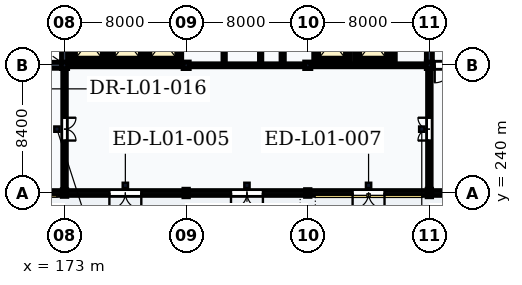
"""IFC4 building model, lengths in metres.
Left out: names, types, materials, properties, quantities, classifications, styles, units other than length and angle.
Written with IfcOpenShell. Run it as: python <this file> out.ifc"""

import sys

from ifc_helpers import new_model, si_unit, direction, frame, frame_2d, origin, origin_2d, place, context, subcontext, project, spatial, rectangle, i_section, extrude, element, fill, save


model = new_model("IFC4")
c1 = context("Model", 3, precision=1e-05, world=origin(), true_north=direction((0.0, 1.0)))
c2 = subcontext(c1, "Body", "Model", "MODEL_VIEW")
j1 = project(units=[si_unit("LENGTHUNIT", "METRE"), si_unit("PLANEANGLEUNIT", "RADIAN")], contexts=[c1])
p1 = place(None, origin())
s1 = spatial("IfcSite", under=j1, at=p1, CompositionType="ELEMENT")
p2 = place(p1, origin())
s2 = spatial("IfcBuilding", under=s1, at=p2, CompositionType="ELEMENT")
p3 = place(p2, origin())
s3 = spatial("IfcBuildingStorey", under=s2, at=p3, CompositionType="ELEMENT", Elevation=0.0)
p4 = place(p3, frame((173.0, 240.0, 0.0), z_axis=(0.0, 0.0, 1.0), x_axis=(1.0, 0.0, 0.0)))
e1 = element("IfcColumn", 1, at=p4, inside=s3, PredefinedType="COLUMN", context=c2, shape_type="SweptSolid", body=[
    extrude(i_section(OverallWidth=0.3, OverallDepth=0.45, WebThickness=0.014, FlangeThickness=0.026, FilletRadius=0.027, at=origin_2d()), origin(), (0.0, 0.0, 1.0), 5.4),
])
p5 = place(p3, frame((173.0, 248.4, 0.0), z_axis=(0.0, 0.0, 1.0), x_axis=(1.0, 0.0, 0.0)))
e2 = element("IfcColumn", 2, at=p5, inside=s3, PredefinedType="COLUMN", context=c2, shape_type="SweptSolid", body=[
    extrude(i_section(OverallWidth=0.412, OverallDepth=0.435, WebThickness=0.036, FlangeThickness=0.057, FilletRadius=0.015, at=origin_2d()), origin(), (0.0, 0.0, 1.0), 5.4),
])
p6 = place(p3, frame((181.0, 240.0, 0.0), z_axis=(0.0, 0.0, 1.0), x_axis=(1.0, 0.0, 0.0)))
e3 = element("IfcColumn", 3, at=p6, inside=s3, PredefinedType="COLUMN", context=c2, shape_type="SweptSolid", body=[
    extrude(i_section(OverallWidth=0.3, OverallDepth=0.5, WebThickness=0.014, FlangeThickness=0.028, FilletRadius=0.027, at=origin_2d()), origin(), (0.0, 0.0, 1.0), 5.4),
])
p7 = place(p3, frame((181.0, 248.4, 0.0), z_axis=(0.0, 0.0, 1.0), x_axis=(1.0, 0.0, 0.0)))
e4 = element("IfcColumn", 4, at=p7, inside=s3, PredefinedType="COLUMN", context=c2, shape_type="SweptSolid", body=[
    extrude(i_section(OverallWidth=0.412, OverallDepth=0.435, WebThickness=0.036, FlangeThickness=0.057, FilletRadius=0.015, at=origin_2d()), origin(), (0.0, 0.0, 1.0), 5.4),
])
p8 = place(p3, frame((189.0, 240.0, 0.0), z_axis=(0.0, 0.0, 1.0), x_axis=(1.0, 0.0, 0.0)))
e5 = element("IfcColumn", 5, at=p8, inside=s3, PredefinedType="COLUMN", context=c2, shape_type="SweptSolid", body=[
    extrude(i_section(OverallWidth=0.3, OverallDepth=0.45, WebThickness=0.014, FlangeThickness=0.026, FilletRadius=0.027, at=origin_2d()), origin(), (0.0, 0.0, 1.0), 5.4),
])
p9 = place(p3, frame((189.0, 248.4, 0.0), z_axis=(0.0, 0.0, 1.0), x_axis=(1.0, 0.0, 0.0)))
e6 = element("IfcColumn", 6, at=p9, inside=s3, PredefinedType="COLUMN", context=c2, shape_type="SweptSolid", body=[
    extrude(i_section(OverallWidth=0.412, OverallDepth=0.435, WebThickness=0.036, FlangeThickness=0.057, FilletRadius=0.015, at=origin_2d()), origin(), (0.0, 0.0, 1.0), 5.4),
])
p10 = place(p3, frame((197.0, 240.0, 0.0), z_axis=(0.0, 0.0, 1.0), x_axis=(1.0, 0.0, 0.0)))
e7 = element("IfcColumn", 7, at=p10, inside=s3, PredefinedType="COLUMN", context=c2, shape_type="SweptSolid", body=[
    extrude(i_section(OverallWidth=0.3, OverallDepth=0.5, WebThickness=0.014, FlangeThickness=0.028, FilletRadius=0.027, at=origin_2d()), origin(), (0.0, 0.0, 1.0), 5.4),
])
p11 = place(p3, frame((197.0, 248.4, 0.0), z_axis=(0.0, 0.0, 1.0), x_axis=(1.0, 0.0, 0.0)))
e8 = element("IfcColumn", 8, at=p11, inside=s3, PredefinedType="COLUMN", context=c2, shape_type="SweptSolid", body=[
    extrude(i_section(OverallWidth=0.412, OverallDepth=0.435, WebThickness=0.036, FlangeThickness=0.057, FilletRadius=0.015, at=origin_2d()), origin(), (0.0, 0.0, 1.0), 5.4),
])
p12 = place(p3, frame((165.006, 240.0, 0.0), z_axis=(0.0, 0.0, 1.0), x_axis=(1.0, 0.0, 0.0)))
e9 = element("IfcWall", 9, at=p12, inside=s3, PredefinedType="SOLIDWALL", context=c2, shape_type="SweptSolid", body=[
    extrude(rectangle(XDim=7.988, YDim=0.32, at=frame_2d((3.994, 0.0))), origin(), (0.0, 0.0, 1.0), 4.838),
])
p13 = place(p12, frame((2.944, 0.0, 0.0)))
e10 = element("IfcOpeningElement", 10, at=p13, cuts=e9, PredefinedType="OPENING", context=c2, shape_type="SweptSolid", body=[
    extrude(rectangle(XDim=2.1, YDim=2.7, at=frame_2d((1.05, 1.35))), frame((0.0, 0.175, 0.0), z_axis=(0.0, -1.0, 0.0), x_axis=(1.0, 0.0, 0.0)), (0.0, 0.0, 1.0), 0.35),
])
p14 = place(p3, frame((173.006, 240.0, 0.0), z_axis=(0.0, 0.0, 1.0), x_axis=(1.0, 0.0, 0.0)))
e11 = element("IfcWall", 11, at=p14, inside=s3, PredefinedType="SOLIDWALL", context=c2, shape_type="SweptSolid", body=[
    extrude(rectangle(XDim=7.988, YDim=0.32, at=frame_2d((3.994, 0.0))), origin(), (0.0, 0.0, 1.0), 4.838),
])
p15 = place(p14, frame((2.944, 0.0, 0.0)))
e12 = element("IfcOpeningElement", 12, at=p15, cuts=e11, PredefinedType="OPENING", context=c2, shape_type="SweptSolid", body=[
    extrude(rectangle(XDim=2.1, YDim=2.7, at=frame_2d((1.05, 1.35))), frame((0.0, 0.175, 0.0), z_axis=(0.0, -1.0, 0.0), x_axis=(1.0, 0.0, 0.0)), (0.0, 0.0, 1.0), 0.35),
])
p16 = place(p3, frame((181.006, 240.0, 0.0), z_axis=(0.0, 0.0, 1.0), x_axis=(1.0, 0.0, 0.0)))
e13 = element("IfcWall", 13, at=p16, inside=s3, PredefinedType="SOLIDWALL", context=c2, shape_type="SweptSolid", body=[
    extrude(rectangle(XDim=7.988, YDim=0.32, at=frame_2d((3.994, 0.0))), origin(), (0.0, 0.0, 1.0), 4.838),
])
p17 = place(p16, frame((2.944, 0.0, 0.0)))
e14 = element("IfcOpeningElement", 14, at=p17, cuts=e13, PredefinedType="OPENING", context=c2, shape_type="SweptSolid", body=[
    extrude(rectangle(XDim=2.1, YDim=2.7, at=frame_2d((1.05, 1.35))), frame((0.0, 0.175, 0.0), z_axis=(0.0, -1.0, 0.0), x_axis=(1.0, 0.0, 0.0)), (0.0, 0.0, 1.0), 0.35),
])
p18 = place(p3, frame((189.006, 240.0, 0.0), z_axis=(0.0, 0.0, 1.0), x_axis=(1.0, 0.0, 0.0)))
e15 = element("IfcWall", 15, at=p18, inside=s3, PredefinedType="SOLIDWALL", context=c2, shape_type="SweptSolid", body=[
    extrude(rectangle(XDim=7.988, YDim=0.32, at=frame_2d((3.994, 0.0))), origin(), (0.0, 0.0, 1.0), 4.838),
])
p19 = place(p18, frame((2.944, 0.0, 0.0)))
e16 = element("IfcOpeningElement", 16, at=p19, cuts=e15, PredefinedType="OPENING", context=c2, shape_type="SweptSolid", body=[
    extrude(rectangle(XDim=2.1, YDim=2.7, at=frame_2d((1.05, 1.35))), frame((0.0, 0.175, 0.0), z_axis=(0.0, -1.0, 0.0), x_axis=(1.0, 0.0, 0.0)), (0.0, 0.0, 1.0), 0.35),
])
p20 = place(p3, frame((197.006, 240.0, 0.0), z_axis=(0.0, 0.0, 1.0), x_axis=(1.0, 0.0, 0.0)))
e17 = element("IfcWall", 17, at=p20, inside=s3, PredefinedType="SOLIDWALL", context=c2, shape_type="SweptSolid", body=[
    extrude(rectangle(XDim=7.988, YDim=0.32, at=frame_2d((3.994, 0.0))), origin(), (0.0, 0.0, 1.0), 4.838),
])
p21 = place(p20, frame((2.944, 0.0, 0.0)))
e18 = element("IfcOpeningElement", 18, at=p21, cuts=e17, PredefinedType="OPENING", context=c2, shape_type="SweptSolid", body=[
    extrude(rectangle(XDim=2.1, YDim=2.7, at=frame_2d((1.05, 1.35))), frame((0.0, 0.175, 0.0), z_axis=(0.0, -1.0, 0.0), x_axis=(1.0, 0.0, 0.0)), (0.0, 0.0, 1.0), 0.35),
])
p22 = place(p3, frame((120.1, 240.1, 5.4), z_axis=(0.0, 0.0, 1.0), x_axis=(1.0, 0.0, 0.0)))
e19 = element("IfcWall", 19, at=p22, inside=s3, PredefinedType="PARAPET", context=c2, shape_type="SweptSolid", body=[
    extrude(rectangle(XDim=167.8, YDim=0.18, at=frame_2d((83.9, 0.0))), origin(), (0.0, 0.0, 1.0), 1.2),
])
p23 = place(p3, frame((165.0, 248.4, 0.0), z_axis=(0.0, 0.0, 1.0), x_axis=(1.0, 0.0, 0.0)))
e20 = element("IfcWall", 20, at=p23, inside=s3, PredefinedType="SHEAR", context=c2, shape_type="SweptSolid", body=[
    extrude(rectangle(XDim=8.0, YDim=0.4, at=frame_2d((4.0, 0.0))), origin(), (0.0, 0.0, 1.0), 5.14),
])
p24 = place(p23, frame((0.35, 0.0, 0.0)))
e21 = element("IfcOpeningElement", 21, at=p24, cuts=e20, PredefinedType="OPENING", context=c2, shape_type="SweptSolid", body=[
    extrude(rectangle(XDim=1.15, YDim=2.15, at=frame_2d((0.575, 1.075))), frame((0.0, 0.215, 0.0), z_axis=(0.0, -1.0, 0.0), x_axis=(1.0, 0.0, 0.0)), (0.0, 0.0, 1.0), 0.43),
])
p25 = place(p3, frame((173.0, 248.4, 0.0), z_axis=(0.0, 0.0, 1.0), x_axis=(0.0, 1.0, 0.0)))
e22 = element("IfcWall", 22, at=p25, inside=s3, PredefinedType="SHEAR", context=c2, shape_type="SweptSolid", body=[
    extrude(rectangle(XDim=6.8, YDim=0.4, at=frame_2d((3.4, 0.0))), origin(), (0.0, 0.0, 1.0), 5.14),
])
p26 = place(p3, frame((197.0, 248.4, 0.0), z_axis=(0.0, 0.0, 1.0), x_axis=(1.0, 0.0, 0.0)))
e23 = element("IfcWall", 23, at=p26, inside=s3, PredefinedType="SHEAR", context=c2, shape_type="SweptSolid", body=[
    extrude(rectangle(XDim=8.0, YDim=0.4, at=frame_2d((4.0, 0.0))), origin(), (0.0, 0.0, 1.0), 5.14),
])
p27 = place(p26, frame((0.35, 0.0, 0.0)))
e24 = element("IfcOpeningElement", 24, at=p27, cuts=e23, PredefinedType="OPENING", context=c2, shape_type="SweptSolid", body=[
    extrude(rectangle(XDim=1.15, YDim=2.15, at=frame_2d((0.575, 1.075))), frame((0.0, 0.215, 0.0), z_axis=(0.0, -1.0, 0.0), x_axis=(1.0, 0.0, 0.0)), (0.0, 0.0, 1.0), 0.43),
])
p28 = place(p3, frame((197.0, 248.4, 0.0), z_axis=(0.0, 0.0, 1.0), x_axis=(0.0, 1.0, 0.0)))
e25 = element("IfcWall", 25, at=p28, inside=s3, PredefinedType="SHEAR", context=c2, shape_type="SweptSolid", body=[
    extrude(rectangle(XDim=6.8, YDim=0.4, at=frame_2d((3.4, 0.0))), origin(), (0.0, 0.0, 1.0), 5.14),
])
p29 = place(p3, frame((173.5, 248.65, 0.0), z_axis=(0.0, 0.0, 1.0), x_axis=(1.0, 0.0, 0.0)))
e26 = element("IfcWall", 26, at=p29, inside=s3, PredefinedType="SHEAR", context=c2, shape_type="SweptSolid", body=[
    extrude(rectangle(XDim=2.2, YDim=0.22, at=frame_2d((1.1, 0.0))), origin(), (0.0, 0.0, 1.0), 5.14),
])
for number, where, z_axis, x_axis in (
    (27, (173.5, 248.65, 0.0), (0.0, 0.0, 1.0), (0.0, 1.0, 0.0)),
    (28, (175.7, 248.65, 0.0), (0.0, 0.0, 1.0), (0.0, 1.0, 0.0)),
):
    element("IfcWall", number, at=place(p3, frame(where, z_axis=z_axis, x_axis=x_axis)), inside=s3, PredefinedType="SHEAR", context=c2, shape_type="SweptSolid", body=[
        extrude(rectangle(XDim=2.7, YDim=0.22, at=frame_2d((1.35, 0.0))), origin(), (0.0, 0.0, 1.0), 5.14),
    ])
p30 = place(p3, frame((176.0, 248.65, 0.0), z_axis=(0.0, 0.0, 1.0), x_axis=(1.0, 0.0, 0.0)))
e29 = element("IfcWall", 29, at=p30, inside=s3, PredefinedType="SHEAR", context=c2, shape_type="SweptSolid", body=[
    extrude(rectangle(XDim=2.2, YDim=0.22, at=frame_2d((1.1, 0.0))), origin(), (0.0, 0.0, 1.0), 5.14),
])
for number, where, z_axis, x_axis in (
    (30, (176.0, 248.65, 0.0), (0.0, 0.0, 1.0), (0.0, 1.0, 0.0)),
    (31, (178.2, 248.65, 0.0), (0.0, 0.0, 1.0), (0.0, 1.0, 0.0)),
):
    element("IfcWall", number, at=place(p3, frame(where, z_axis=z_axis, x_axis=x_axis)), inside=s3, PredefinedType="SHEAR", context=c2, shape_type="SweptSolid", body=[
        extrude(rectangle(XDim=2.7, YDim=0.22, at=frame_2d((1.35, 0.0))), origin(), (0.0, 0.0, 1.0), 5.14),
    ])
p31 = place(p3, frame((178.4, 248.65, 0.0), z_axis=(0.0, 0.0, 1.0), x_axis=(1.0, 0.0, 0.0)))
e32 = element("IfcWall", 32, at=p31, inside=s3, PredefinedType="SHEAR", context=c2, shape_type="SweptSolid", body=[
    extrude(rectangle(XDim=2.2, YDim=0.22, at=frame_2d((1.1, 0.0))), origin(), (0.0, 0.0, 1.0), 5.14),
])
for number, where, z_axis, x_axis in (
    (33, (178.4, 248.65, 0.0), (0.0, 0.0, 1.0), (0.0, 1.0, 0.0)),
    (34, (180.6, 248.65, 0.0), (0.0, 0.0, 1.0), (0.0, 1.0, 0.0)),
):
    element("IfcWall", number, at=place(p3, frame(where, z_axis=z_axis, x_axis=x_axis)), inside=s3, PredefinedType="SHEAR", context=c2, shape_type="SweptSolid", body=[
        extrude(rectangle(XDim=2.7, YDim=0.22, at=frame_2d((1.35, 0.0))), origin(), (0.0, 0.0, 1.0), 5.14),
    ])
p32 = place(p3, frame((189.5, 248.65, 0.0), z_axis=(0.0, 0.0, 1.0), x_axis=(1.0, 0.0, 0.0)))
e35 = element("IfcWall", 35, at=p32, inside=s3, PredefinedType="SHEAR", context=c2, shape_type="SweptSolid", body=[
    extrude(rectangle(XDim=2.2, YDim=0.22, at=frame_2d((1.1, 0.0))), origin(), (0.0, 0.0, 1.0), 5.14),
])
for number, where, z_axis, x_axis in (
    (36, (189.5, 248.65, 0.0), (0.0, 0.0, 1.0), (0.0, 1.0, 0.0)),
    (37, (191.7, 248.65, 0.0), (0.0, 0.0, 1.0), (0.0, 1.0, 0.0)),
):
    element("IfcWall", number, at=place(p3, frame(where, z_axis=z_axis, x_axis=x_axis)), inside=s3, PredefinedType="SHEAR", context=c2, shape_type="SweptSolid", body=[
        extrude(rectangle(XDim=2.7, YDim=0.22, at=frame_2d((1.35, 0.0))), origin(), (0.0, 0.0, 1.0), 5.14),
    ])
p33 = place(p3, frame((192.2, 248.65, 0.0), z_axis=(0.0, 0.0, 1.0), x_axis=(1.0, 0.0, 0.0)))
e38 = element("IfcWall", 38, at=p33, inside=s3, PredefinedType="SHEAR", context=c2, shape_type="SweptSolid", body=[
    extrude(rectangle(XDim=2.2, YDim=0.22, at=frame_2d((1.1, 0.0))), origin(), (0.0, 0.0, 1.0), 5.14),
])
for number, where, z_axis, x_axis in (
    (39, (192.2, 248.65, 0.0), (0.0, 0.0, 1.0), (0.0, 1.0, 0.0)),
    (40, (194.4, 248.65, 0.0), (0.0, 0.0, 1.0), (0.0, 1.0, 0.0)),
):
    element("IfcWall", number, at=place(p3, frame(where, z_axis=z_axis, x_axis=x_axis)), inside=s3, PredefinedType="SHEAR", context=c2, shape_type="SweptSolid", body=[
        extrude(rectangle(XDim=2.7, YDim=0.22, at=frame_2d((1.35, 0.0))), origin(), (0.0, 0.0, 1.0), 5.14),
    ])
p34 = place(p3, frame((194.65, 248.4, 0.0), z_axis=(0.0, 0.0, 1.0), x_axis=(0.0, 1.0, 0.0)))
e41 = element("IfcWall", 41, at=p34, inside=s3, PredefinedType="PARTITIONING", context=c2, shape_type="SweptSolid", body=[
    extrude(rectangle(XDim=6.8, YDim=0.22, at=frame_2d((3.4, 0.0))), origin(), (0.0, 0.0, 1.0), 5.14),
])
for number, where, z_axis, x_axis in (
    (42, (183.5, 248.4, 0.0), (0.0, 0.0, 1.0), (0.0, 1.0, 0.0)),
    (43, (185.9, 248.4, 0.0), (0.0, 0.0, 1.0), (0.0, 1.0, 0.0)),
):
    element("IfcWall", number, at=place(p3, frame(where, z_axis=z_axis, x_axis=x_axis)), inside=s3, PredefinedType="PARTITIONING", context=c2, shape_type="SweptSolid", body=[
        extrude(rectangle(XDim=6.8, YDim=0.16, at=frame_2d((3.4, 0.0))), origin(), (0.0, 0.0, 1.0), 5.14),
    ])
p35 = place(p3, frame((187.35, 248.4, 0.0), z_axis=(0.0, 0.0, 1.0), x_axis=(0.0, 1.0, 0.0)))
e44 = element("IfcWall", 44, at=p35, inside=s3, PredefinedType="PARTITIONING", context=c2, shape_type="SweptSolid", body=[
    extrude(rectangle(XDim=6.8, YDim=0.22, at=frame_2d((3.4, 0.0))), origin(), (0.0, 0.0, 1.0), 5.14),
])
p36 = place(p3, frame((181.0, 248.4, 0.0), z_axis=(0.0, 0.0, 1.0), x_axis=(1.0, 0.0, 0.0)))
e45 = element("IfcWall", 45, at=p36, inside=s3, PredefinedType="PARTITIONING", context=c2, shape_type="SweptSolid", body=[
    extrude(rectangle(XDim=8.0, YDim=0.2, at=frame_2d((4.0, 0.0))), origin(), (0.0, 0.0, 1.0), 4.638),
])
p37 = place(p3, frame((173.0, 240.0, 0.0), z_axis=(0.0, 0.0, 1.0), x_axis=(0.0, 1.0, 0.0)))
e46 = element("IfcWall", 46, at=p37, inside=s3, PredefinedType="PARTITIONING", context=c2, shape_type="SweptSolid", body=[
    extrude(rectangle(XDim=8.4, YDim=0.24, at=frame_2d((4.2, 0.0))), origin(), (0.0, 0.0, 1.0), 4.688),
])
p38 = place(p37, frame((3.45, 0.0, 0.0)))
e47 = element("IfcOpeningElement", 47, at=p38, cuts=e46, PredefinedType="OPENING", context=c2, shape_type="SweptSolid", body=[
    extrude(rectangle(XDim=1.5, YDim=2.1, at=frame_2d((0.75, 1.05))), frame((0.0, 0.135, 0.0), z_axis=(0.0, -1.0, 0.0), x_axis=(1.0, 0.0, 0.0)), (0.0, 0.0, 1.0), 0.27),
])
p39 = place(p3, frame((197.0, 240.0, 0.0), z_axis=(0.0, 0.0, 1.0), x_axis=(0.0, 1.0, 0.0)))
e48 = element("IfcWall", 48, at=p39, inside=s3, PredefinedType="PARTITIONING", context=c2, shape_type="SweptSolid", body=[
    extrude(rectangle(XDim=8.4, YDim=0.24, at=frame_2d((4.2, 0.0))), origin(), (0.0, 0.0, 1.0), 4.688),
])
p40 = place(p39, frame((3.45, 0.0, 0.0)))
e49 = element("IfcOpeningElement", 49, at=p40, cuts=e48, PredefinedType="OPENING", context=c2, shape_type="SweptSolid", body=[
    extrude(rectangle(XDim=1.5, YDim=2.1, at=frame_2d((0.75, 1.05))), frame((0.0, 0.135, 0.0), z_axis=(0.0, -1.0, 0.0), x_axis=(1.0, 0.0, 0.0)), (0.0, 0.0, 1.0), 0.27),
])
for number, where, z_axis, x_axis in (
    (50, (173.0, 248.4, 0.0), (0.0, 0.0, 1.0), (1.0, 0.0, 0.0)),
    (51, (189.0, 248.4, 0.0), (0.0, 0.0, 1.0), (1.0, 0.0, 0.0)),
):
    element("IfcWall", number, at=place(p3, frame(where, z_axis=z_axis, x_axis=x_axis)), inside=s3, PredefinedType="PARTITIONING", context=c2, shape_type="SweptSolid", body=[
        extrude(rectangle(XDim=8.0, YDim=0.2, at=frame_2d((4.0, 0.0))), origin(), (0.0, 0.0, 1.0), 4.638),
    ])
p41 = place(p15, frame((2.1, 0.0, 0.0), z_axis=(0.0, 0.0, 1.0), x_axis=(-1.0, 0.0, 0.0)))
e52 = element("IfcDoor", 52, at=p41, inside=s3, OperationType="DOUBLE_DOOR_SINGLE_SWING", PredefinedType="DOOR", context=c2, shape_type="SweptSolid", body=[
    extrude(rectangle(XDim=2.1, YDim=2.7, at=frame_2d((1.05, 1.35))), frame((0.0, 0.025, 0.0), z_axis=(0.0, -1.0, 0.0), x_axis=(1.0, 0.0, 0.0)), (0.0, 0.0, 1.0), 0.05),
])
fill(e12, e52)
p42 = place(p17, frame((2.1, 0.0, 0.0), z_axis=(0.0, 0.0, 1.0), x_axis=(-1.0, 0.0, 0.0)))
e53 = element("IfcDoor", 53, at=p42, inside=s3, OperationType="DOUBLE_DOOR_SINGLE_SWING", PredefinedType="DOOR", context=c2, shape_type="SweptSolid", body=[
    extrude(rectangle(XDim=2.1, YDim=2.7, at=frame_2d((1.05, 1.35))), frame((0.0, 0.025, 0.0), z_axis=(0.0, -1.0, 0.0), x_axis=(1.0, 0.0, 0.0)), (0.0, 0.0, 1.0), 0.05),
])
fill(e14, e53)
p43 = place(p19, frame((2.1, 0.0, 0.0), z_axis=(0.0, 0.0, 1.0), x_axis=(-1.0, 0.0, 0.0)))
e54 = element("IfcDoor", 54, at=p43, inside=s3, OperationType="DOUBLE_DOOR_SINGLE_SWING", PredefinedType="DOOR", context=c2, shape_type="SweptSolid", body=[
    extrude(rectangle(XDim=2.1, YDim=2.7, at=frame_2d((1.05, 1.35))), frame((0.0, 0.025, 0.0), z_axis=(0.0, -1.0, 0.0), x_axis=(1.0, 0.0, 0.0)), (0.0, 0.0, 1.0), 0.05),
])
fill(e16, e54)
p44 = place(p27, frame((1.15, 0.0, 0.0), z_axis=(0.0, 0.0, 1.0), x_axis=(-1.0, 0.0, 0.0)))
e55 = element("IfcDoor", 55, at=p44, inside=s3, OperationType="SINGLE_SWING_RIGHT", PredefinedType="DOOR", context=c2, shape_type="SweptSolid", body=[
    extrude(rectangle(XDim=1.15, YDim=2.15, at=frame_2d((0.575, 1.075))), frame((0.0, 0.025, 0.0), z_axis=(0.0, -1.0, 0.0), x_axis=(1.0, 0.0, 0.0)), (0.0, 0.0, 1.0), 0.05),
])
fill(e24, e55)
p45 = place(p38, frame((1.5, 0.0, 0.0), z_axis=(0.0, 0.0, 1.0), x_axis=(-1.0, 0.0, 0.0)))
e56 = element("IfcDoor", 56, at=p45, inside=s3, OperationType="DOUBLE_DOOR_SINGLE_SWING", PredefinedType="DOOR", context=c2, shape_type="SweptSolid", body=[
    extrude(rectangle(XDim=1.5, YDim=2.1, at=frame_2d((0.75, 1.05))), frame((0.0, 0.025, 0.0), z_axis=(0.0, -1.0, 0.0), x_axis=(1.0, 0.0, 0.0)), (0.0, 0.0, 1.0), 0.05),
])
fill(e47, e56)
p46 = place(p40, origin())
e57 = element("IfcDoor", 57, at=p46, inside=s3, OperationType="DOUBLE_DOOR_SINGLE_SWING", PredefinedType="DOOR", context=c2, shape_type="SweptSolid", body=[
    extrude(rectangle(XDim=1.5, YDim=2.1, at=frame_2d((0.75, 1.05))), frame((0.0, 0.025, 0.0), z_axis=(0.0, -1.0, 0.0), x_axis=(1.0, 0.0, 0.0)), (0.0, 0.0, 1.0), 0.05),
])
fill(e49, e57)
save(model, sys.argv[1])
